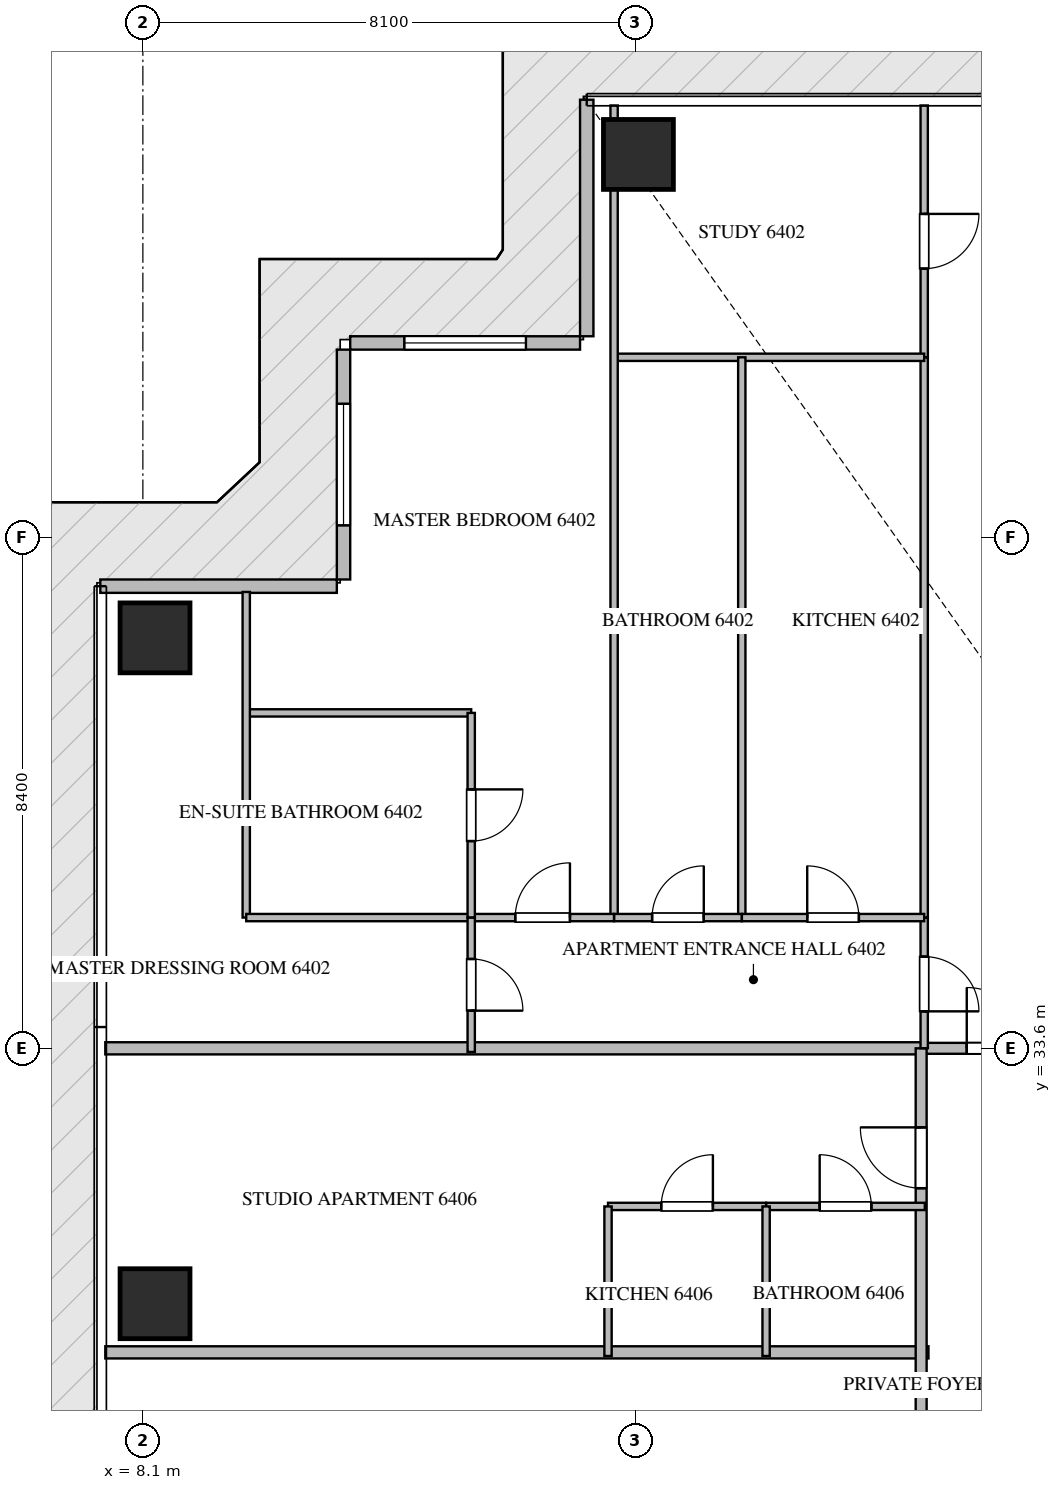
"""IFC4 building model, lengths in metres.
Left out: names, types, materials, properties, quantities, classifications, styles, units other than length and angle.
Written with IfcOpenShell. Run it as: python <this file> out.ifc"""

import sys

from ifc_helpers import new_model, si_unit, direction, frame, frame_2d, origin, origin_2d, place, context, subcontext, project, spatial, rectangle, extrude, source, transform, mapped, element, fill, save


model = new_model("IFC4")
c1 = context("Model", 3, precision=1e-05, world=origin(), true_north=direction((0.0, 1.0)))
c2 = subcontext(c1, "Body", "Model", "MODEL_VIEW")
j1 = project(units=[si_unit("LENGTHUNIT", "METRE"), si_unit("PLANEANGLEUNIT", "RADIAN")], contexts=[c1])
p1 = place(None, origin())
s1 = spatial("IfcSite", under=j1, at=p1, CompositionType="ELEMENT")
p2 = place(p1, origin())
s2 = spatial("IfcBuilding", under=s1, at=p2, CompositionType="ELEMENT")
p3 = place(p2, frame((0.0, 0.0, 256.65)))
s3 = spatial("IfcBuildingStorey", under=s2, at=p3, CompositionType="ELEMENT", Elevation=256.65)
m1 = source(origin(), c2, "Body", "SweptSolid", [
    extrude(rectangle(XDim=1.15, YDim=1.15, at=origin_2d()), origin(), (0.0, 0.0, 1.0), 3.85),
])
for number, where, z_axis, x_axis in (
    (1, (16.25, 48.3, -0.26), (0.0, 0.0, 1.0), (1.0, 0.0, 0.0)),
    (2, (8.3, 29.4, -0.26), (0.0, 0.0, 1.0), (1.0, 0.0, 0.0)),
    (3, (8.3, 40.35, -0.26), (0.0, 0.0, 1.0), (1.0, 0.0, 0.0)),
):
    element("IfcColumn", number, at=place(p3, frame(where, z_axis=z_axis, x_axis=x_axis)), inside=s3, PredefinedType="COLUMN", context=c2, shape_type="MappedRepresentation", body=[
        mapped(m1, transform((0.0, 0.0, 0.0), scale=1.0)),
    ])
p4 = place(p3, frame((15.4, 49.2, 0.0), z_axis=(0.0, 0.0, 1.0), x_axis=(0.0, -1.0, 0.0)))
e4 = element("IfcWall", 4, at=p4, inside=s3, PredefinedType="ELEMENTEDWALL", context=c2, shape_type="SweptSolid", body=[
    extrude(rectangle(XDim=3.89, YDim=0.22, at=frame_2d((1.945, 0.0))), origin(), (0.0, 0.0, 1.0), 3.575),
])
p5 = place(p3, frame((15.29, 45.2, 0.0), z_axis=(0.0, 0.0, 1.0), x_axis=(-1.0, 0.0, 0.0)))
e5 = element("IfcWall", 5, at=p5, inside=s3, PredefinedType="ELEMENTEDWALL", context=c2, shape_type="SweptSolid", body=[
    extrude(rectangle(XDim=3.78, YDim=0.22, at=frame_2d((1.89, 0.0))), origin(), (0.0, 0.0, 1.0), 3.575),
])
p6 = place(p5, frame((0.89, 0.0, 0.65)))
e6 = element("IfcOpeningElement", 6, at=p6, cuts=e5, PredefinedType="OPENING", context=c2, shape_type="SweptSolid", body=[
    extrude(rectangle(XDim=2.0, YDim=2.2, at=frame_2d((1.0, 1.1))), frame((0.0, 0.12, 0.0), z_axis=(0.0, -1.0, 0.0), x_axis=(1.0, 0.0, 0.0)), (0.0, 0.0, 1.0), 0.24),
])
p7 = place(p3, frame((11.4, 45.09, 0.0), z_axis=(0.0, 0.0, 1.0), x_axis=(0.0, -1.0, 0.0)))
e7 = element("IfcWall", 7, at=p7, inside=s3, PredefinedType="ELEMENTEDWALL", context=c2, shape_type="SweptSolid", body=[
    extrude(rectangle(XDim=3.78, YDim=0.22, at=frame_2d((1.89, 0.0))), origin(), (0.0, 0.0, 1.0), 3.575),
])
p8 = place(p7, frame((0.89, 0.0, 0.65)))
e8 = element("IfcOpeningElement", 8, at=p8, cuts=e7, PredefinedType="OPENING", context=c2, shape_type="SweptSolid", body=[
    extrude(rectangle(XDim=2.0, YDim=2.2, at=frame_2d((1.0, 1.1))), frame((0.0, 0.12, 0.0), z_axis=(0.0, -1.0, 0.0), x_axis=(1.0, 0.0, 0.0)), (0.0, 0.0, 1.0), 0.24),
])
p9 = place(p3, frame((11.29, 41.2, 0.0), z_axis=(0.0, 0.0, 1.0), x_axis=(-1.0, 0.0, 0.0)))
e9 = element("IfcWall", 9, at=p9, inside=s3, PredefinedType="ELEMENTEDWALL", context=c2, shape_type="SweptSolid", body=[
    extrude(rectangle(XDim=3.89, YDim=0.22, at=frame_2d((1.945, 0.0))), origin(), (0.0, 0.0, 1.0), 3.575),
])
p10 = place(p3, frame((7.482, 28.6, 0.0), z_axis=(0.0, 0.0, 1.0), x_axis=(1.0, 0.0, 0.0)))
e10 = element("IfcWall", 10, at=p10, inside=s3, PredefinedType="PARTITIONING", context=c2, shape_type="SweptSolid", body=[
    extrude(rectangle(XDim=13.538, YDim=0.2, at=frame_2d((6.769, 0.0))), origin(), (0.0, 0.0, 1.0), 3.59),
])
p11 = place(p3, frame((7.482, 33.6, 0.0), z_axis=(0.0, 0.0, 1.0), x_axis=(1.0, 0.0, 0.0)))
e11 = element("IfcWall", 11, at=p11, inside=s3, PredefinedType="PARTITIONING", context=c2, shape_type="SweptSolid", body=[
    extrude(rectangle(XDim=13.418, YDim=0.2, at=frame_2d((6.709, 0.0))), origin(), (0.0, 0.0, 1.0), 3.59),
])
p12 = place(p3, frame((20.902, 33.6, 0.0), z_axis=(0.0, 0.0, 1.0), x_axis=(1.0, 0.0, 0.0)))
e12 = element("IfcWall", 12, at=p12, inside=s3, PredefinedType="PARTITIONING", context=c2, shape_type="SweptSolid", body=[
    extrude(rectangle(XDim=2.496, YDim=0.18, at=frame_2d((1.248, 0.0))), origin(), (0.0, 0.0, 1.0), 3.59),
])
p13 = place(p12, frame((0.748, 0.0, 0.0)))
e13 = element("IfcOpeningElement", 13, at=p13, cuts=e12, PredefinedType="OPENING", context=c2, shape_type="SweptSolid", body=[
    extrude(rectangle(XDim=1.0, YDim=2.15, at=frame_2d((0.5, 1.075))), frame((0.0, 0.1, 0.0), z_axis=(0.0, -1.0, 0.0), x_axis=(1.0, 0.0, 0.0)), (0.0, 0.0, 1.0), 0.2),
])
p14 = place(p3, frame((20.9, 16.8, 0.0), z_axis=(0.0, 0.0, 1.0), x_axis=(0.0, 1.0, 0.0)))
e14 = element("IfcWall", 14, at=p14, inside=s3, PredefinedType="PARTITIONING", context=c2, shape_type="SweptSolid", body=[
    extrude(rectangle(XDim=16.8, YDim=0.18, at=frame_2d((8.4, 0.0))), origin(), (0.0, 0.0, 1.0), 3.59),
])
p15 = place(p14, frame((3.018, 0.0, 0.0)))
e15 = element("IfcOpeningElement", 15, at=p15, cuts=e14, PredefinedType="OPENING", context=c2, shape_type="SweptSolid", body=[
    extrude(rectangle(XDim=1.0, YDim=2.15, at=frame_2d((0.5, 1.075))), frame((0.0, 0.1, 0.0), z_axis=(0.0, -1.0, 0.0), x_axis=(1.0, 0.0, 0.0)), (0.0, 0.0, 1.0), 0.2),
])
p16 = place(p14, frame((9.18, 0.0, 0.0)))
e16 = element("IfcOpeningElement", 16, at=p16, cuts=e14, PredefinedType="OPENING", context=c2, shape_type="SweptSolid", body=[
    extrude(rectangle(XDim=1.0, YDim=2.15, at=frame_2d((0.5, 1.075))), frame((0.0, 0.1, 0.0), z_axis=(0.0, -1.0, 0.0), x_axis=(1.0, 0.0, 0.0)), (0.0, 0.0, 1.0), 0.2),
])
p17 = place(p14, frame((14.5, 0.0, 0.0)))
e17 = element("IfcOpeningElement", 17, at=p17, cuts=e14, PredefinedType="OPENING", context=c2, shape_type="SweptSolid", body=[
    extrude(rectangle(XDim=1.0, YDim=2.15, at=frame_2d((0.5, 1.075))), frame((0.0, 0.1, 0.0), z_axis=(0.0, -1.0, 0.0), x_axis=(1.0, 0.0, 0.0)), (0.0, 0.0, 1.0), 0.2),
])
p18 = place(p3, frame((20.95, 35.75, 0.0), z_axis=(0.0, 0.0, 1.0), x_axis=(0.0, -1.0, 0.0)))
e18 = element("IfcWall", 18, at=p18, inside=s3, PredefinedType="PARTITIONING", context=c2, shape_type="SweptSolid", body=[
    extrude(rectangle(XDim=2.148, YDim=0.12, at=frame_2d((1.074, 0.0))), origin(), (0.0, 0.0, 1.0), 3.59),
])
p19 = place(p18, frame((0.642, 0.0, 0.0)))
e19 = element("IfcOpeningElement", 19, at=p19, cuts=e18, PredefinedType="OPENING", context=c2, shape_type="SweptSolid", body=[
    extrude(rectangle(XDim=0.9, YDim=2.1, at=frame_2d((0.45, 1.05))), frame((0.0, 0.07, 0.0), z_axis=(0.0, -1.0, 0.0), x_axis=(1.0, 0.0, 0.0)), (0.0, 0.0, 1.0), 0.14),
])
p20 = place(p3, frame((20.95, 49.105, 0.0), z_axis=(0.0, 0.0, 1.0), x_axis=(0.0, -1.0, 0.0)))
e20 = element("IfcWall", 20, at=p20, inside=s3, PredefinedType="PARTITIONING", context=c2, shape_type="SweptSolid", body=[
    extrude(rectangle(XDim=4.141, YDim=0.12, at=frame_2d((2.07, 0.0))), origin(), (0.0, 0.0, 1.0), 3.59),
])
p21 = place(p20, frame((1.783, 0.0, 0.0)))
e21 = element("IfcOpeningElement", 21, at=p21, cuts=e20, PredefinedType="OPENING", context=c2, shape_type="SweptSolid", body=[
    extrude(rectangle(XDim=0.9, YDim=2.1, at=frame_2d((0.45, 1.05))), frame((0.0, 0.07, 0.0), z_axis=(0.0, -1.0, 0.0), x_axis=(1.0, 0.0, 0.0)), (0.0, 0.0, 1.0), 0.14),
])
p22 = place(p3, frame((20.95, 44.962, 0.0), z_axis=(0.0, 0.0, 1.0), x_axis=(0.0, -1.0, 0.0)))
e22 = element("IfcWall", 22, at=p22, inside=s3, PredefinedType="PARTITIONING", context=c2, shape_type="SweptSolid", body=[
    extrude(rectangle(XDim=9.21, YDim=0.12, at=frame_2d((4.605, 0.0))), origin(), (0.0, 0.0, 1.0), 3.59),
])
p23 = place(p3, frame((15.85, 44.964, 0.0), z_axis=(0.0, 0.0, 1.0), x_axis=(1.0, 0.0, 0.0)))
e23 = element("IfcWall", 23, at=p23, inside=s3, PredefinedType="PARTITIONING", context=c2, shape_type="SweptSolid", body=[
    extrude(rectangle(XDim=5.1, YDim=0.12, at=frame_2d((2.55, 0.0))), origin(), (0.0, 0.0, 1.0), 3.59),
])
p24 = place(p3, frame((15.85, 49.105, 0.0), z_axis=(0.0, 0.0, 1.0), x_axis=(0.0, -1.0, 0.0)))
e24 = element("IfcWall", 24, at=p24, inside=s3, PredefinedType="PARTITIONING", context=c2, shape_type="SweptSolid", body=[
    extrude(rectangle(XDim=13.355, YDim=0.12, at=frame_2d((6.677, 0.0))), origin(), (0.0, 0.0, 1.0), 3.59),
])
p25 = place(p3, frame((17.95, 44.964, 0.0), z_axis=(0.0, 0.0, 1.0), x_axis=(0.0, -1.0, 0.0)))
e25 = element("IfcWall", 25, at=p25, inside=s3, PredefinedType="PARTITIONING", context=c2, shape_type="SweptSolid", body=[
    extrude(rectangle(XDim=9.214, YDim=0.12, at=frame_2d((4.607, 0.0))), origin(), (0.0, 0.0, 1.0), 3.59),
])
p26 = place(p3, frame((15.85, 35.75, 0.0), z_axis=(0.0, 0.0, 1.0), x_axis=(1.0, 0.0, 0.0)))
e26 = element("IfcWall", 26, at=p26, inside=s3, PredefinedType="PARTITIONING", context=c2, shape_type="SweptSolid", body=[
    extrude(rectangle(XDim=2.1, YDim=0.12, at=frame_2d((1.05, 0.0))), origin(), (0.0, 0.0, 1.0), 3.59),
])
p27 = place(p26, frame((0.625, 0.0, 0.0)))
e27 = element("IfcOpeningElement", 27, at=p27, cuts=e26, PredefinedType="OPENING", context=c2, shape_type="SweptSolid", body=[
    extrude(rectangle(XDim=0.85, YDim=2.1, at=frame_2d((0.425, 1.05))), frame((0.0, 0.07, 0.0), z_axis=(0.0, -1.0, 0.0), x_axis=(1.0, 0.0, 0.0)), (0.0, 0.0, 1.0), 0.14),
])
p28 = place(p3, frame((17.952, 35.75, 0.0), z_axis=(0.0, 0.0, 1.0), x_axis=(1.0, 0.0, 0.0)))
e28 = element("IfcWall", 28, at=p28, inside=s3, PredefinedType="PARTITIONING", context=c2, shape_type="SweptSolid", body=[
    extrude(rectangle(XDim=2.998, YDim=0.12, at=frame_2d((1.499, 0.0))), origin(), (0.0, 0.0, 1.0), 3.59),
])
p29 = place(p28, frame((1.074, 0.0, 0.0)))
e29 = element("IfcOpeningElement", 29, at=p29, cuts=e28, PredefinedType="OPENING", context=c2, shape_type="SweptSolid", body=[
    extrude(rectangle(XDim=0.85, YDim=2.1, at=frame_2d((0.425, 1.05))), frame((0.0, 0.07, 0.0), z_axis=(0.0, -1.0, 0.0), x_axis=(1.0, 0.0, 0.0)), (0.0, 0.0, 1.0), 0.14),
])
p30 = place(p3, frame((13.5, 35.75, 0.0), z_axis=(0.0, 0.0, 1.0), x_axis=(1.0, 0.0, 0.0)))
e30 = element("IfcWall", 30, at=p30, inside=s3, PredefinedType="PARTITIONING", context=c2, shape_type="SweptSolid", body=[
    extrude(rectangle(XDim=2.348, YDim=0.12, at=frame_2d((1.174, 0.0))), origin(), (0.0, 0.0, 1.0), 3.59),
])
p31 = place(p30, frame((0.724, 0.0, 0.0)))
e31 = element("IfcOpeningElement", 31, at=p31, cuts=e30, PredefinedType="OPENING", context=c2, shape_type="SweptSolid", body=[
    extrude(rectangle(XDim=0.9, YDim=2.1, at=frame_2d((0.45, 1.05))), frame((0.0, 0.07, 0.0), z_axis=(0.0, -1.0, 0.0), x_axis=(1.0, 0.0, 0.0)), (0.0, 0.0, 1.0), 0.14),
])
p32 = place(p3, frame((9.8, 39.116, 0.0), z_axis=(0.0, 0.0, 1.0), x_axis=(1.0, 0.0, 0.0)))
e32 = element("IfcWall", 32, at=p32, inside=s3, PredefinedType="PARTITIONING", context=c2, shape_type="SweptSolid", body=[
    extrude(rectangle(XDim=3.7, YDim=0.12, at=frame_2d((1.85, 0.0))), origin(), (0.0, 0.0, 1.0), 3.59),
])
p33 = place(p3, frame((9.8, 41.105, 0.0), z_axis=(0.0, 0.0, 1.0), x_axis=(0.0, -1.0, 0.0)))
e33 = element("IfcWall", 33, at=p33, inside=s3, PredefinedType="PARTITIONING", context=c2, shape_type="SweptSolid", body=[
    extrude(rectangle(XDim=5.355, YDim=0.12, at=frame_2d((2.677, 0.0))), origin(), (0.0, 0.0, 1.0), 3.59),
])
p34 = place(p3, frame((9.8, 35.75, 0.0), z_axis=(0.0, 0.0, 1.0), x_axis=(1.0, 0.0, 0.0)))
e34 = element("IfcWall", 34, at=p34, inside=s3, PredefinedType="PARTITIONING", context=c2, shape_type="SweptSolid", body=[
    extrude(rectangle(XDim=3.698, YDim=0.12, at=frame_2d((1.849, 0.0))), origin(), (0.0, 0.0, 1.0), 3.59),
])
p35 = place(p3, frame((13.5, 39.116, 0.0), z_axis=(0.0, 0.0, 1.0), x_axis=(0.0, -1.0, 0.0)))
e35 = element("IfcWall", 35, at=p35, inside=s3, PredefinedType="PARTITIONING", context=c2, shape_type="SweptSolid", body=[
    extrude(rectangle(XDim=3.366, YDim=0.12, at=frame_2d((1.683, 0.0))), origin(), (0.0, 0.0, 1.0), 3.59),
])
p36 = place(p35, frame((1.258, 0.0, 0.0)))
e36 = element("IfcOpeningElement", 36, at=p36, cuts=e35, PredefinedType="OPENING", context=c2, shape_type="SweptSolid", body=[
    extrude(rectangle(XDim=0.85, YDim=2.1, at=frame_2d((0.425, 1.05))), frame((0.0, 0.07, 0.0), z_axis=(0.0, -1.0, 0.0), x_axis=(1.0, 0.0, 0.0)), (0.0, 0.0, 1.0), 0.14),
])
p37 = place(p3, frame((13.5, 35.748, 0.0), z_axis=(0.0, 0.0, 1.0), x_axis=(0.0, -1.0, 0.0)))
e37 = element("IfcWall", 37, at=p37, inside=s3, PredefinedType="PARTITIONING", context=c2, shape_type="SweptSolid", body=[
    extrude(rectangle(XDim=2.208, YDim=0.12, at=frame_2d((1.104, 0.0))), origin(), (0.0, 0.0, 1.0), 3.59),
])
p38 = place(p37, frame((0.679, 0.0, 0.0)))
e38 = element("IfcOpeningElement", 38, at=p38, cuts=e37, PredefinedType="OPENING", context=c2, shape_type="SweptSolid", body=[
    extrude(rectangle(XDim=0.85, YDim=2.1, at=frame_2d((0.425, 1.05))), frame((0.0, 0.07, 0.0), z_axis=(0.0, -1.0, 0.0), x_axis=(1.0, 0.0, 0.0)), (0.0, 0.0, 1.0), 0.14),
])
p39 = place(p3, frame((15.75, 31.0, 0.0), z_axis=(0.0, 0.0, 1.0), x_axis=(1.0, 0.0, 0.0)))
e39 = element("IfcWall", 39, at=p39, inside=s3, PredefinedType="PARTITIONING", context=c2, shape_type="SweptSolid", body=[
    extrude(rectangle(XDim=2.6, YDim=0.12, at=frame_2d((1.3, 0.0))), origin(), (0.0, 0.0, 1.0), 3.59),
])
p40 = place(p39, frame((0.875, 0.0, 0.0)))
e40 = element("IfcOpeningElement", 40, at=p40, cuts=e39, PredefinedType="OPENING", context=c2, shape_type="SweptSolid", body=[
    extrude(rectangle(XDim=0.85, YDim=2.1, at=frame_2d((0.425, 1.05))), frame((0.0, 0.07, 0.0), z_axis=(0.0, -1.0, 0.0), x_axis=(1.0, 0.0, 0.0)), (0.0, 0.0, 1.0), 0.14),
])
p41 = place(p3, frame((18.352, 31.0, 0.0), z_axis=(0.0, 0.0, 1.0), x_axis=(1.0, 0.0, 0.0)))
e41 = element("IfcWall", 41, at=p41, inside=s3, PredefinedType="PARTITIONING", context=c2, shape_type="SweptSolid", body=[
    extrude(rectangle(XDim=2.608, YDim=0.12, at=frame_2d((1.304, 0.0))), origin(), (0.0, 0.0, 1.0), 3.59),
])
p42 = place(p41, frame((0.879, 0.0, 0.0)))
e42 = element("IfcOpeningElement", 42, at=p42, cuts=e41, PredefinedType="OPENING", context=c2, shape_type="SweptSolid", body=[
    extrude(rectangle(XDim=0.85, YDim=2.1, at=frame_2d((0.425, 1.05))), frame((0.0, 0.07, 0.0), z_axis=(0.0, -1.0, 0.0), x_axis=(1.0, 0.0, 0.0)), (0.0, 0.0, 1.0), 0.14),
])
for number, where, z_axis, x_axis in (
    (43, (18.35, 28.54, 0.0), (0.0, 0.0, 1.0), (0.0, 1.0, 0.0)),
    (44, (15.75, 28.54, 0.0), (0.0, 0.0, 1.0), (0.0, 1.0, 0.0)),
):
    element("IfcWall", number, at=place(p3, frame(where, z_axis=z_axis, x_axis=x_axis)), inside=s3, PredefinedType="PARTITIONING", context=c2, shape_type="SweptSolid", body=[
        extrude(rectangle(XDim=2.46, YDim=0.12, at=frame_2d((1.23, 0.0))), origin(), (0.0, 0.0, 1.0), 3.59),
    ])
m2 = source(origin(), c2, "Body", "SweptSolid", [
    extrude(rectangle(XDim=2.0, YDim=2.2, at=frame_2d((1.0, 1.1))), frame((0.0, 0.03, 0.0), z_axis=(0.0, -1.0, 0.0), x_axis=(1.0, 0.0, 0.0)), (0.0, 0.0, 1.0), 0.06),
])
p43 = place(p6, origin())
e45 = element("IfcWindow", 45, at=p43, inside=s3, PartitioningType="SINGLE_PANEL", PredefinedType="WINDOW", context=c2, shape_type="MappedRepresentation", body=[
    mapped(m2, transform((0.0, 0.0, 0.0), scale=1.0)),
])
fill(e6, e45)
p44 = place(p8, origin())
e46 = element("IfcWindow", 46, at=p44, inside=s3, PartitioningType="SINGLE_PANEL", PredefinedType="WINDOW", context=c2, shape_type="MappedRepresentation", body=[
    mapped(m2, transform((0.0, 0.0, 0.0), scale=1.0)),
])
fill(e8, e46)
m3 = source(origin(), c2, "Body", "SweptSolid", [
    extrude(rectangle(XDim=1.0, YDim=2.15, at=frame_2d((0.5, 1.075))), frame((0.0, 0.025, 0.0), z_axis=(0.0, -1.0, 0.0), x_axis=(1.0, 0.0, 0.0)), (0.0, 0.0, 1.0), 0.05),
])
p45 = place(p13, origin())
e47 = element("IfcDoor", 47, at=p45, inside=s3, OperationType="SINGLE_SWING_LEFT", PredefinedType="DOOR", context=c2, shape_type="MappedRepresentation", body=[
    mapped(m3, transform((0.0, 0.0, 0.0), scale=1.0)),
])
fill(e13, e47)
p46 = place(p17, origin())
e48 = element("IfcDoor", 48, at=p46, inside=s3, OperationType="SINGLE_SWING_RIGHT", PredefinedType="DOOR", context=c2, shape_type="MappedRepresentation", body=[
    mapped(m3, transform((0.0, 0.0, 0.0), scale=1.0)),
])
fill(e17, e48)
m4 = source(origin(), c2, "Body", "SweptSolid", [
    extrude(rectangle(XDim=0.9, YDim=2.1, at=frame_2d((0.45, 1.05))), frame((0.0, 0.025, 0.0), z_axis=(0.0, -1.0, 0.0), x_axis=(1.0, 0.0, 0.0)), (0.0, 0.0, 1.0), 0.05),
])
p47 = place(p19, origin())
e49 = element("IfcDoor", 49, at=p47, inside=s3, OperationType="SINGLE_SWING_RIGHT", PredefinedType="DOOR", context=c2, shape_type="MappedRepresentation", body=[
    mapped(m4, transform((0.0, 0.0, 0.0), scale=1.0)),
])
fill(e19, e49)
p48 = place(p21, origin())
e50 = element("IfcDoor", 50, at=p48, inside=s3, OperationType="SINGLE_SWING_LEFT", PredefinedType="DOOR", context=c2, shape_type="MappedRepresentation", body=[
    mapped(m4, transform((0.0, 0.0, 0.0), scale=1.0)),
])
fill(e21, e50)
m5 = source(origin(), c2, "Body", "SweptSolid", [
    extrude(rectangle(XDim=0.85, YDim=2.1, at=frame_2d((0.425, 1.05))), frame((0.0, 0.025, 0.0), z_axis=(0.0, -1.0, 0.0), x_axis=(1.0, 0.0, 0.0)), (0.0, 0.0, 1.0), 0.05),
])
p49 = place(p27, origin())
e51 = element("IfcDoor", 51, at=p49, inside=s3, OperationType="SINGLE_SWING_RIGHT", PredefinedType="DOOR", context=c2, shape_type="MappedRepresentation", body=[
    mapped(m5, transform((0.0, 0.0, 0.0), scale=1.0)),
])
fill(e27, e51)
p50 = place(p29, origin())
e52 = element("IfcDoor", 52, at=p50, inside=s3, OperationType="SINGLE_SWING_LEFT", PredefinedType="DOOR", context=c2, shape_type="MappedRepresentation", body=[
    mapped(m5, transform((0.0, 0.0, 0.0), scale=1.0)),
])
fill(e29, e52)
p51 = place(p31, origin())
e53 = element("IfcDoor", 53, at=p51, inside=s3, OperationType="SINGLE_SWING_RIGHT", PredefinedType="DOOR", context=c2, shape_type="MappedRepresentation", body=[
    mapped(m4, transform((0.0, 0.0, 0.0), scale=1.0)),
])
fill(e31, e53)
p52 = place(p36, origin())
e54 = element("IfcDoor", 54, at=p52, inside=s3, OperationType="SINGLE_SWING_LEFT", PredefinedType="DOOR", context=c2, shape_type="MappedRepresentation", body=[
    mapped(m5, transform((0.0, 0.0, 0.0), scale=1.0)),
])
fill(e36, e54)
p53 = place(p38, origin())
e55 = element("IfcDoor", 55, at=p53, inside=s3, OperationType="SINGLE_SWING_RIGHT", PredefinedType="DOOR", context=c2, shape_type="MappedRepresentation", body=[
    mapped(m5, transform((0.0, 0.0, 0.0), scale=1.0)),
])
fill(e38, e55)
p54 = place(p40, origin())
e56 = element("IfcDoor", 56, at=p54, inside=s3, OperationType="SINGLE_SWING_RIGHT", PredefinedType="DOOR", context=c2, shape_type="MappedRepresentation", body=[
    mapped(m5, transform((0.0, 0.0, 0.0), scale=1.0)),
])
fill(e40, e56)
p55 = place(p42, origin())
e57 = element("IfcDoor", 57, at=p55, inside=s3, OperationType="SINGLE_SWING_LEFT", PredefinedType="DOOR", context=c2, shape_type="MappedRepresentation", body=[
    mapped(m5, transform((0.0, 0.0, 0.0), scale=1.0)),
])
fill(e42, e57)
save(model, sys.argv[1])
